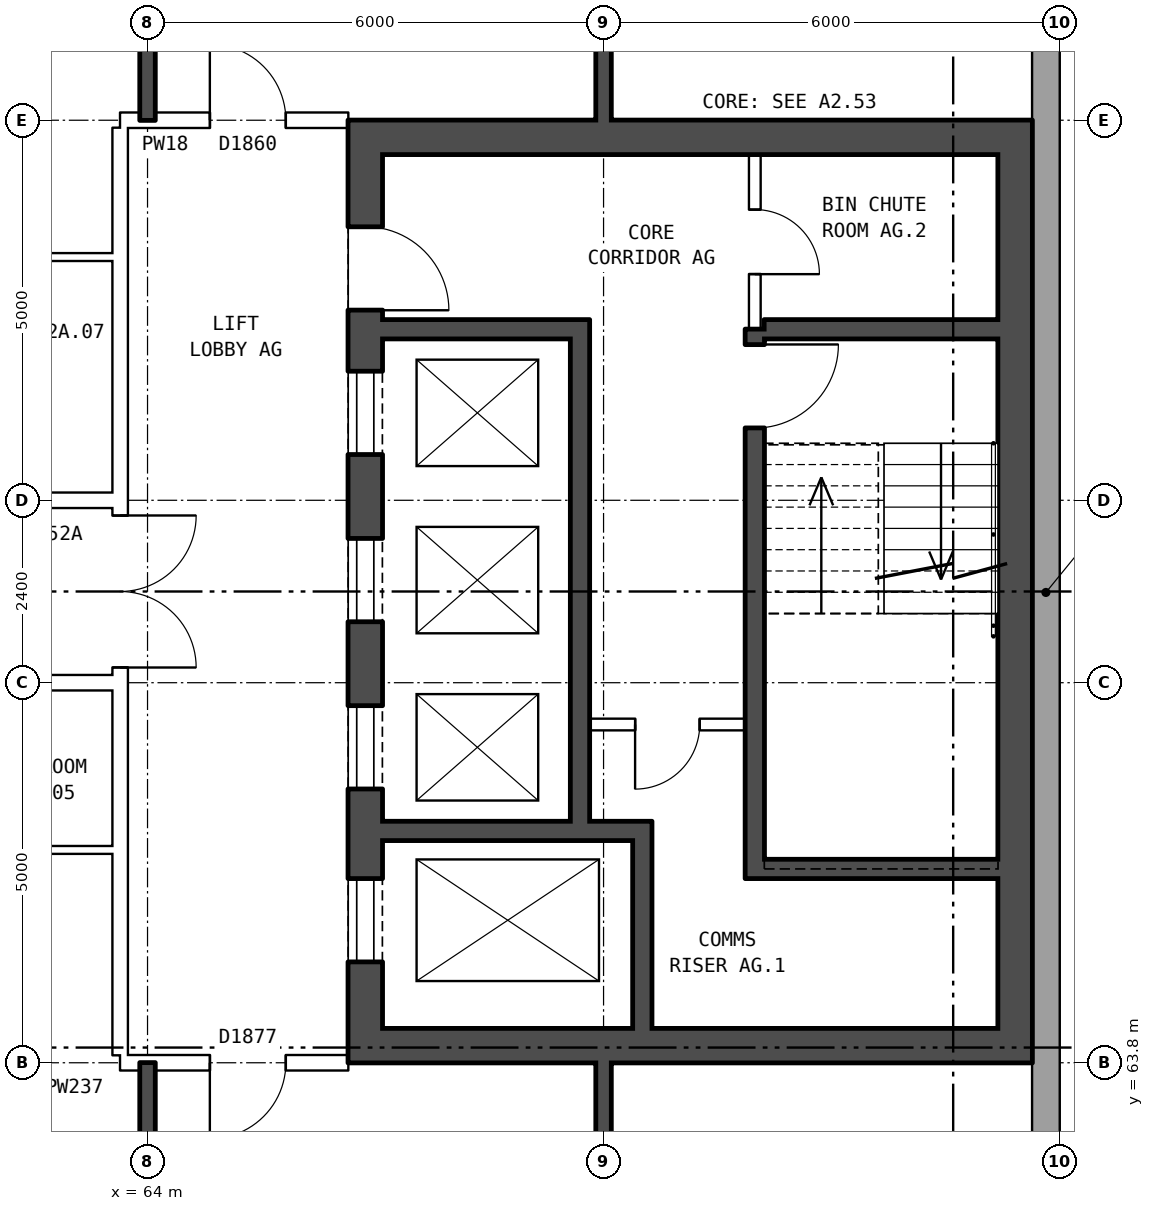
"""IFC4 building model, lengths in metres.
Left out: names, types, materials, properties, quantities, classifications, styles, units other than length and angle.
Written with IfcOpenShell. Run it as: python <this file> out.ifc"""

import sys

from ifc_helpers import new_model, si_unit, direction, frame, frame_2d, origin, place, context, subcontext, project, spatial, rectangle, extrude, element, fill, save


model = new_model("IFC4")
c1 = context("Model", 3, precision=1e-05, world=origin(), true_north=direction((0.0, 1.0)))
c2 = subcontext(c1, "Body", "Model", "MODEL_VIEW")
j1 = project(units=[si_unit("LENGTHUNIT", "METRE"), si_unit("PLANEANGLEUNIT", "RADIAN")], contexts=[c1])
p1 = place(None, origin())
s1 = spatial("IfcSite", under=j1, at=p1, CompositionType="ELEMENT")
p2 = place(p1, origin())
s2 = spatial("IfcBuilding", under=s1, at=p2, CompositionType="ELEMENT")
p3 = place(p2, frame((0.0, 0.0, 185.1)))
s3 = spatial("IfcBuildingStorey", under=s2, at=p3, CompositionType="ELEMENT", Elevation=185.1)
p4 = place(p3, frame((75.82, 57.075, 0.0), z_axis=(0.0, 0.0, 1.0), x_axis=(0.0, 1.0, 0.0)))
e1 = element("IfcWall", 1, at=p4, inside=s3, PredefinedType="STANDARD", context=c2, shape_type="SweptSolid", body=[
    extrude(rectangle(XDim=25.851, YDim=0.36, at=frame_2d((12.925, 0.0))), origin(), (0.0, 0.0, 1.0), 2.85),
])
p5 = place(p4, frame((1.625, 0.0, 0.8)))
e2 = element("IfcOpeningElement", 2, at=p5, cuts=e1, PredefinedType="OPENING", context=c2, shape_type="SweptSolid", body=[
    extrude(rectangle(XDim=1.6, YDim=1.8, at=frame_2d((0.8, 0.9))), frame((0.0, 0.19, 0.0), z_axis=(0.0, -1.0, 0.0), x_axis=(1.0, 0.0, 0.0)), (0.0, 0.0, 1.0), 0.38),
])
p6 = place(p4, frame((3.525, 0.0, 0.8)))
e3 = element("IfcOpeningElement", 3, at=p6, cuts=e1, PredefinedType="OPENING", context=c2, shape_type="SweptSolid", body=[
    extrude(rectangle(XDim=0.8, YDim=1.8, at=frame_2d((0.4, 0.9))), frame((0.0, 0.19, 0.0), z_axis=(0.0, -1.0, 0.0), x_axis=(1.0, 0.0, 0.0)), (0.0, 0.0, 1.0), 0.38),
])
p7 = place(p4, frame((20.2, 0.0, 0.8)))
e4 = element("IfcOpeningElement", 4, at=p7, cuts=e1, PredefinedType="OPENING", context=c2, shape_type="SweptSolid", body=[
    extrude(rectangle(XDim=0.6, YDim=0.9, at=frame_2d((0.3, 0.45))), frame((0.0, 0.19, 0.0), z_axis=(0.0, -1.0, 0.0), x_axis=(1.0, 0.0, 0.0)), (0.0, 0.0, 1.0), 0.38),
])
p8 = place(p4, frame((22.625, 0.0, 0.8)))
e5 = element("IfcOpeningElement", 5, at=p8, cuts=e1, PredefinedType="OPENING", context=c2, shape_type="SweptSolid", body=[
    extrude(rectangle(XDim=1.6, YDim=1.8, at=frame_2d((0.8, 0.9))), frame((0.0, 0.19, 0.0), z_axis=(0.0, -1.0, 0.0), x_axis=(1.0, 0.0, 0.0)), (0.0, 0.0, 1.0), 0.38),
])
p9 = place(p4, frame((4.625, 0.0, 0.8)))
e6 = element("IfcOpeningElement", 6, at=p9, cuts=e1, PredefinedType="OPENING", context=c2, shape_type="SweptSolid", body=[
    extrude(rectangle(XDim=1.0, YDim=0.9, at=frame_2d((0.5, 0.45))), frame((0.0, 0.19, 0.0), z_axis=(0.0, -1.0, 0.0), x_axis=(1.0, 0.0, 0.0)), (0.0, 0.0, 1.0), 0.38),
])
p10 = place(p4, frame((21.1, 0.0, 0.8)))
e7 = element("IfcOpeningElement", 7, at=p10, cuts=e1, PredefinedType="OPENING", context=c2, shape_type="SweptSolid", body=[
    extrude(rectangle(XDim=1.2, YDim=1.5, at=frame_2d((0.6, 0.75))), frame((0.0, 0.19, 0.0), z_axis=(0.0, -1.0, 0.0), x_axis=(1.0, 0.0, 0.0)), (0.0, 0.0, 1.0), 0.38),
])
p11 = place(p3, frame((66.865, 63.8, 0.0), z_axis=(0.0, 0.0, 1.0), x_axis=(0.0, 1.0, 0.0)))
e8 = element("IfcWall", 8, at=p11, inside=s3, PredefinedType="SHEAR", context=c2, shape_type="SweptSolid", body=[
    extrude(rectangle(XDim=12.4, YDim=0.45, at=frame_2d((6.2, 0.0))), origin(), (0.0, 0.0, 1.0), 2.85),
])
p12 = place(p11, frame((1.325, 0.0, 0.0)))
e9 = element("IfcOpeningElement", 9, at=p12, cuts=e8, PredefinedType="OPENING", context=c2, shape_type="SweptSolid", body=[
    extrude(rectangle(XDim=1.1, YDim=2.1, at=frame_2d((0.55, 1.05))), frame((0.0, 0.235, 0.0), z_axis=(0.0, -1.0, 0.0), x_axis=(1.0, 0.0, 0.0)), (0.0, 0.0, 1.0), 0.47),
])
p13 = place(p11, frame((3.6, 0.0, 0.0)))
e10 = element("IfcOpeningElement", 10, at=p13, cuts=e8, PredefinedType="OPENING", context=c2, shape_type="SweptSolid", body=[
    extrude(rectangle(XDim=1.1, YDim=2.1, at=frame_2d((0.55, 1.05))), frame((0.0, 0.235, 0.0), z_axis=(0.0, -1.0, 0.0), x_axis=(1.0, 0.0, 0.0)), (0.0, 0.0, 1.0), 0.47),
])
p14 = place(p11, frame((5.8, 0.0, 0.0)))
e11 = element("IfcOpeningElement", 11, at=p14, cuts=e8, PredefinedType="OPENING", context=c2, shape_type="SweptSolid", body=[
    extrude(rectangle(XDim=1.1, YDim=2.1, at=frame_2d((0.55, 1.05))), frame((0.0, 0.235, 0.0), z_axis=(0.0, -1.0, 0.0), x_axis=(1.0, 0.0, 0.0)), (0.0, 0.0, 1.0), 0.47),
])
p15 = place(p11, frame((8.0, 0.0, 0.0)))
e12 = element("IfcOpeningElement", 12, at=p15, cuts=e8, PredefinedType="OPENING", context=c2, shape_type="SweptSolid", body=[
    extrude(rectangle(XDim=1.1, YDim=2.1, at=frame_2d((0.55, 1.05))), frame((0.0, 0.235, 0.0), z_axis=(0.0, -1.0, 0.0), x_axis=(1.0, 0.0, 0.0)), (0.0, 0.0, 1.0), 0.47),
])
p16 = place(p11, frame((9.9, 0.0, 0.0)))
e13 = element("IfcOpeningElement", 13, at=p16, cuts=e8, PredefinedType="OPENING", context=c2, shape_type="SweptSolid", body=[
    extrude(rectangle(XDim=1.1, YDim=2.1, at=frame_2d((0.55, 1.05))), frame((0.0, 0.235, 0.0), z_axis=(0.0, -1.0, 0.0), x_axis=(1.0, 0.0, 0.0)), (0.0, 0.0, 1.0), 0.47),
])
p17 = place(p3, frame((75.415, 63.8, 0.0), z_axis=(0.0, 0.0, 1.0), x_axis=(0.0, 1.0, 0.0)))
e14 = element("IfcWall", 14, at=p17, inside=s3, PredefinedType="SHEAR", context=c2, shape_type="SweptSolid", body=[
    extrude(rectangle(XDim=12.4, YDim=0.45, at=frame_2d((6.2, 0.0))), origin(), (0.0, 0.0, 1.0), 2.85),
])
for number, where, z_axis, x_axis in (
    (15, (67.09, 64.025, 0.0), (0.0, 0.0, 1.0), (1.0, 0.0, 0.0)),
    (16, (67.09, 75.975, 0.0), (0.0, 0.0, 1.0), (1.0, 0.0, 0.0)),
):
    element("IfcWall", number, at=place(p3, frame(where, z_axis=z_axis, x_axis=x_axis)), inside=s3, PredefinedType="SHEAR", context=c2, shape_type="SweptSolid", body=[
        extrude(rectangle(XDim=8.1, YDim=0.45, at=frame_2d((4.05, 0.0))), origin(), (0.0, 0.0, 1.0), 2.85),
    ])
p18 = place(p3, frame((72.115, 66.35, 0.0), z_axis=(0.0, 0.0, 1.0), x_axis=(1.0, 0.0, 0.0)))
e17 = element("IfcWall", 17, at=p18, inside=s3, PredefinedType="SHEAR", context=c2, shape_type="SweptSolid", body=[
    extrude(rectangle(XDim=3.075, YDim=0.25, at=frame_2d((1.538, 0.0))), origin(), (0.0, 0.0, 1.0), 2.85),
])
p19 = place(p3, frame((67.09, 66.85, 0.0), z_axis=(0.0, 0.0, 1.0), x_axis=(1.0, 0.0, 0.0)))
e18 = element("IfcWall", 18, at=p19, inside=s3, PredefinedType="SHEAR", context=c2, shape_type="SweptSolid", body=[
    extrude(rectangle(XDim=3.545, YDim=0.25, at=frame_2d((1.772, 0.0))), origin(), (0.0, 0.0, 1.0), 2.85),
])
p20 = place(p3, frame((69.815, 68.25, 0.0), z_axis=(0.0, 0.0, 1.0), x_axis=(1.0, 0.0, 0.0)))
e19 = element("IfcWall", 19, at=p20, inside=s3, PredefinedType="PARTITIONING", context=c2, shape_type="SweptSolid", body=[
    extrude(rectangle(XDim=2.05, YDim=0.15, at=frame_2d((1.025, 0.0))), origin(), (0.0, 0.0, 1.0), 2.85),
])
p21 = place(p20, frame((0.6, 0.0, 0.0)))
e20 = element("IfcOpeningElement", 20, at=p21, cuts=e19, PredefinedType="OPENING", context=c2, shape_type="SweptSolid", body=[
    extrude(rectangle(XDim=0.85, YDim=2.1, at=frame_2d((0.425, 1.05))), frame((0.0, 0.085, 0.0), z_axis=(0.0, -1.0, 0.0), x_axis=(1.0, 0.0, 0.0)), (0.0, 0.0, 1.0), 0.17),
])
p22 = place(p3, frame((67.09, 73.45, 0.0), z_axis=(0.0, 0.0, 1.0), x_axis=(1.0, 0.0, 0.0)))
e21 = element("IfcWall", 21, at=p22, inside=s3, PredefinedType="SHEAR", context=c2, shape_type="SweptSolid", body=[
    extrude(rectangle(XDim=2.475, YDim=0.25, at=frame_2d((1.237, 0.0))), origin(), (0.0, 0.0, 1.0), 2.85),
])
p23 = place(p3, frame((72.115, 73.45, 0.0), z_axis=(0.0, 0.0, 1.0), x_axis=(1.0, 0.0, 0.0)))
e22 = element("IfcWall", 22, at=p23, inside=s3, PredefinedType="SHEAR", context=c2, shape_type="SweptSolid", body=[
    extrude(rectangle(XDim=3.075, YDim=0.25, at=frame_2d((1.538, 0.0))), origin(), (0.0, 0.0, 1.0), 2.85),
])
p24 = place(p3, frame((69.69, 66.975, 0.0), z_axis=(0.0, 0.0, 1.0), x_axis=(0.0, 1.0, 0.0)))
e23 = element("IfcWall", 23, at=p24, inside=s3, PredefinedType="SHEAR", context=c2, shape_type="SweptSolid", body=[
    extrude(rectangle(XDim=6.6, YDim=0.25, at=frame_2d((3.3, 0.0))), origin(), (0.0, 0.0, 1.0), 2.85),
])
p25 = place(p3, frame((70.51, 64.25, 0.0), z_axis=(0.0, 0.0, 1.0), x_axis=(0.0, 1.0, 0.0)))
e24 = element("IfcWall", 24, at=p25, inside=s3, PredefinedType="SHEAR", context=c2, shape_type="SweptSolid", body=[
    extrude(rectangle(XDim=2.475, YDim=0.25, at=frame_2d((1.238, 0.0))), origin(), (0.0, 0.0, 1.0), 2.85),
])
p26 = place(p3, frame((71.99, 66.225, 0.0), z_axis=(0.0, 0.0, 1.0), x_axis=(0.0, 1.0, 0.0)))
e25 = element("IfcWall", 25, at=p26, inside=s3, PredefinedType="SHEAR", context=c2, shape_type="SweptSolid", body=[
    extrude(rectangle(XDim=7.225, YDim=0.25, at=frame_2d((3.612, 0.0))), origin(), (0.0, 0.0, 1.0), 2.85),
])
p27 = place(p26, frame((5.925, 0.0, 0.0)))
e26 = element("IfcOpeningElement", 26, at=p27, cuts=e25, PredefinedType="OPENING", context=c2, shape_type="SweptSolid", body=[
    extrude(rectangle(XDim=1.1, YDim=2.1, at=frame_2d((0.55, 1.05))), frame((0.0, 0.135, 0.0), z_axis=(0.0, -1.0, 0.0), x_axis=(1.0, 0.0, 0.0)), (0.0, 0.0, 1.0), 0.27),
])
p28 = place(p3, frame((71.99, 73.45, 0.0), z_axis=(0.0, 0.0, 1.0), x_axis=(0.0, 1.0, 0.0)))
e27 = element("IfcWall", 27, at=p28, inside=s3, PredefinedType="PARTITIONING", context=c2, shape_type="SweptSolid", body=[
    extrude(rectangle(XDim=2.3, YDim=0.15, at=frame_2d((1.15, 0.0))), origin(), (0.0, 0.0, 1.0), 2.85),
])
p29 = place(p28, frame((0.725, 0.0, 0.0)))
e28 = element("IfcOpeningElement", 28, at=p29, cuts=e27, PredefinedType="OPENING", context=c2, shape_type="SweptSolid", body=[
    extrude(rectangle(XDim=0.85, YDim=2.1, at=frame_2d((0.425, 1.05))), frame((0.0, 0.085, 0.0), z_axis=(0.0, -1.0, 0.0), x_axis=(1.0, 0.0, 0.0)), (0.0, 0.0, 1.0), 0.17),
])
p30 = place(p3, frame((63.64, 63.9, 0.0), z_axis=(0.0, 0.0, 1.0), x_axis=(0.0, 1.0, 0.0)))
e29 = element("IfcWall", 29, at=p30, inside=s3, PredefinedType="PARTITIONING", context=c2, shape_type="SweptSolid", body=[
    extrude(rectangle(XDim=12.2, YDim=0.2, at=frame_2d((6.1, 0.0))), origin(), (0.0, 0.0, 1.0), 2.85),
])
p31 = place(p30, frame((5.1, 0.0, 0.0)))
e30 = element("IfcOpeningElement", 30, at=p31, cuts=e29, PredefinedType="OPENING", context=c2, shape_type="SweptSolid", body=[
    extrude(rectangle(XDim=2.0, YDim=2.1, at=frame_2d((1.0, 1.05))), frame((0.0, 0.11, 0.0), z_axis=(0.0, -1.0, 0.0), x_axis=(1.0, 0.0, 0.0)), (0.0, 0.0, 1.0), 0.22),
])
p32 = place(p3, frame((63.64, 63.8, 0.0), z_axis=(0.0, 0.0, 1.0), x_axis=(1.0, 0.0, 0.0)))
e31 = element("IfcWall", 31, at=p32, inside=s3, PredefinedType="PARTITIONING", context=c2, shape_type="SweptSolid", body=[
    extrude(rectangle(XDim=3.0, YDim=0.2, at=frame_2d((1.5, 0.0))), origin(), (0.0, 0.0, 1.0), 2.85),
])
p33 = place(p32, frame((1.18, 0.0, 0.0)))
e32 = element("IfcOpeningElement", 32, at=p33, cuts=e31, PredefinedType="OPENING", context=c2, shape_type="SweptSolid", body=[
    extrude(rectangle(XDim=1.0, YDim=2.1, at=frame_2d((0.5, 1.05))), frame((0.0, 0.11, 0.0), z_axis=(0.0, -1.0, 0.0), x_axis=(1.0, 0.0, 0.0)), (0.0, 0.0, 1.0), 0.22),
])
p34 = place(p3, frame((61.0, 66.6, 0.0), z_axis=(0.0, 0.0, 1.0), x_axis=(1.0, 0.0, 0.0)))
e33 = element("IfcWall", 33, at=p34, inside=s3, PredefinedType="PARTITIONING", context=c2, shape_type="SweptSolid", body=[
    extrude(rectangle(XDim=2.64, YDim=0.1, at=frame_2d((1.32, 0.0))), origin(), (0.0, 0.0, 1.0), 2.85),
])
p35 = place(p3, frame((44.36, 68.8, 0.0), z_axis=(0.0, 0.0, 1.0), x_axis=(1.0, 0.0, 0.0)))
e34 = element("IfcWall", 34, at=p35, inside=s3, PredefinedType="PARTITIONING", context=c2, shape_type="SweptSolid", body=[
    extrude(rectangle(XDim=19.28, YDim=0.2, at=frame_2d((9.64, 0.0))), origin(), (0.0, 0.0, 1.0), 2.85),
])
p36 = place(p35, frame((14.64, 0.0, 0.0)))
e35 = element("IfcOpeningElement", 35, at=p36, cuts=e34, PredefinedType="OPENING", context=c2, shape_type="SweptSolid", body=[
    extrude(rectangle(XDim=1.0, YDim=2.1, at=frame_2d((0.5, 1.05))), frame((0.0, 0.11, 0.0), z_axis=(0.0, -1.0, 0.0), x_axis=(1.0, 0.0, 0.0)), (0.0, 0.0, 1.0), 0.22),
])
p37 = place(p35, frame((5.64, 0.0, 0.0)))
e36 = element("IfcOpeningElement", 36, at=p37, cuts=e34, PredefinedType="OPENING", context=c2, shape_type="SweptSolid", body=[
    extrude(rectangle(XDim=1.0, YDim=2.1, at=frame_2d((0.5, 1.05))), frame((0.0, 0.11, 0.0), z_axis=(0.0, -1.0, 0.0), x_axis=(1.0, 0.0, 0.0)), (0.0, 0.0, 1.0), 0.22),
])
p38 = place(p3, frame((44.36, 71.2, 0.0), z_axis=(0.0, 0.0, 1.0), x_axis=(1.0, 0.0, 0.0)))
e37 = element("IfcWall", 37, at=p38, inside=s3, PredefinedType="PARTITIONING", context=c2, shape_type="SweptSolid", body=[
    extrude(rectangle(XDim=19.28, YDim=0.2, at=frame_2d((9.64, 0.0))), origin(), (0.0, 0.0, 1.0), 2.85),
])
p39 = place(p38, frame((14.64, 0.0, 0.0)))
e38 = element("IfcOpeningElement", 38, at=p39, cuts=e37, PredefinedType="OPENING", context=c2, shape_type="SweptSolid", body=[
    extrude(rectangle(XDim=1.0, YDim=2.1, at=frame_2d((0.5, 1.05))), frame((0.0, 0.11, 0.0), z_axis=(0.0, -1.0, 0.0), x_axis=(1.0, 0.0, 0.0)), (0.0, 0.0, 1.0), 0.22),
])
p40 = place(p38, frame((5.64, 0.0, 0.0)))
e39 = element("IfcOpeningElement", 39, at=p40, cuts=e37, PredefinedType="OPENING", context=c2, shape_type="SweptSolid", body=[
    extrude(rectangle(XDim=1.0, YDim=2.1, at=frame_2d((0.5, 1.05))), frame((0.0, 0.11, 0.0), z_axis=(0.0, -1.0, 0.0), x_axis=(1.0, 0.0, 0.0)), (0.0, 0.0, 1.0), 0.22),
])
p41 = place(p3, frame((61.0, 74.4, 0.0), z_axis=(0.0, 0.0, 1.0), x_axis=(1.0, 0.0, 0.0)))
e40 = element("IfcWall", 40, at=p41, inside=s3, PredefinedType="PARTITIONING", context=c2, shape_type="SweptSolid", body=[
    extrude(rectangle(XDim=2.64, YDim=0.1, at=frame_2d((1.32, 0.0))), origin(), (0.0, 0.0, 1.0), 2.85),
])
p42 = place(p3, frame((63.64, 76.2, 0.0), z_axis=(0.0, 0.0, 1.0), x_axis=(1.0, 0.0, 0.0)))
e41 = element("IfcWall", 41, at=p42, inside=s3, PredefinedType="PARTITIONING", context=c2, shape_type="SweptSolid", body=[
    extrude(rectangle(XDim=3.0, YDim=0.2, at=frame_2d((1.5, 0.0))), origin(), (0.0, 0.0, 1.0), 2.85),
])
p43 = place(p42, frame((1.18, 0.0, 0.0)))
e42 = element("IfcOpeningElement", 42, at=p43, cuts=e41, PredefinedType="OPENING", context=c2, shape_type="SweptSolid", body=[
    extrude(rectangle(XDim=1.0, YDim=2.1, at=frame_2d((0.5, 1.05))), frame((0.0, 0.11, 0.0), z_axis=(0.0, -1.0, 0.0), x_axis=(1.0, 0.0, 0.0)), (0.0, 0.0, 1.0), 0.22),
])
for number, where, z_axis, x_axis in (
    (43, (64.0, 54.36, 0.0), (0.0, 0.0, 1.0), (0.0, 1.0, 0.0)),
    (44, (64.0, 76.2, 0.0), (0.0, 0.0, 1.0), (0.0, 1.0, 0.0)),
):
    element("IfcWall", number, at=place(p3, frame(where, z_axis=z_axis, x_axis=x_axis)), inside=s3, PredefinedType="SOLIDWALL", context=c2, shape_type="SweptSolid", body=[
        extrude(rectangle(XDim=9.44, YDim=0.2, at=frame_2d((4.72, 0.0))), origin(), (0.0, 0.0, 1.0), 2.85),
    ])
p44 = place(p3, frame((70.0, 54.36, 0.0), z_axis=(0.0, 0.0, 1.0), x_axis=(0.0, 1.0, 0.0)))
e45 = element("IfcWall", 45, at=p44, inside=s3, PredefinedType="SOLIDWALL", context=c2, shape_type="SweptSolid", body=[
    extrude(rectangle(XDim=9.44, YDim=0.2, at=frame_2d((4.72, 0.0))), origin(), (0.0, 0.0, 1.0), 2.85),
])
p45 = place(p44, frame((7.34, 0.0, 0.0)))
e46 = element("IfcOpeningElement", 46, at=p45, cuts=e45, PredefinedType="OPENING", context=c2, shape_type="SweptSolid", body=[
    extrude(rectangle(XDim=0.9, YDim=2.1, at=frame_2d((0.45, 1.05))), frame((0.0, 0.11, 0.0), z_axis=(0.0, -1.0, 0.0), x_axis=(1.0, 0.0, 0.0)), (0.0, 0.0, 1.0), 0.22),
])
p46 = place(p3, frame((70.0, 76.2, 0.0), z_axis=(0.0, 0.0, 1.0), x_axis=(0.0, 1.0, 0.0)))
e47 = element("IfcWall", 47, at=p46, inside=s3, PredefinedType="SOLIDWALL", context=c2, shape_type="SweptSolid", body=[
    extrude(rectangle(XDim=9.44, YDim=0.2, at=frame_2d((4.72, 0.0))), origin(), (0.0, 0.0, 1.0), 2.85),
])
p47 = place(p46, frame((1.35, 0.0, 0.0)))
e48 = element("IfcOpeningElement", 48, at=p47, cuts=e47, PredefinedType="OPENING", context=c2, shape_type="SweptSolid", body=[
    extrude(rectangle(XDim=0.9, YDim=2.1, at=frame_2d((0.45, 1.05))), frame((0.0, 0.11, 0.0), z_axis=(0.0, -1.0, 0.0), x_axis=(1.0, 0.0, 0.0)), (0.0, 0.0, 1.0), 0.22),
])
p48 = place(p12, origin())
e49 = element("IfcDoor", 49, at=p48, inside=s3, OperationType="DOUBLE_DOOR_SLIDING", PredefinedType="DOOR", context=c2, shape_type="SweptSolid", body=[
    extrude(rectangle(XDim=1.1, YDim=2.1, at=frame_2d((0.55, 1.05))), frame((0.0, -0.16, 0.0), z_axis=(0.0, -1.0, 0.0), x_axis=(1.0, 0.0, 0.0)), (0.0, 0.0, 1.0), 0.05),
])
fill(e9, e49)
p49 = place(p13, origin())
e50 = element("IfcDoor", 50, at=p49, inside=s3, OperationType="DOUBLE_DOOR_SLIDING", PredefinedType="DOOR", context=c2, shape_type="SweptSolid", body=[
    extrude(rectangle(XDim=1.1, YDim=2.1, at=frame_2d((0.55, 1.05))), frame((0.0, -0.16, 0.0), z_axis=(0.0, -1.0, 0.0), x_axis=(1.0, 0.0, 0.0)), (0.0, 0.0, 1.0), 0.05),
])
fill(e10, e50)
p50 = place(p14, origin())
e51 = element("IfcDoor", 51, at=p50, inside=s3, OperationType="DOUBLE_DOOR_SLIDING", PredefinedType="DOOR", context=c2, shape_type="SweptSolid", body=[
    extrude(rectangle(XDim=1.1, YDim=2.1, at=frame_2d((0.55, 1.05))), frame((0.0, -0.16, 0.0), z_axis=(0.0, -1.0, 0.0), x_axis=(1.0, 0.0, 0.0)), (0.0, 0.0, 1.0), 0.05),
])
fill(e11, e51)
p51 = place(p15, origin())
e52 = element("IfcDoor", 52, at=p51, inside=s3, OperationType="DOUBLE_DOOR_SLIDING", PredefinedType="DOOR", context=c2, shape_type="SweptSolid", body=[
    extrude(rectangle(XDim=1.1, YDim=2.1, at=frame_2d((0.55, 1.05))), frame((0.0, -0.16, 0.0), z_axis=(0.0, -1.0, 0.0), x_axis=(1.0, 0.0, 0.0)), (0.0, 0.0, 1.0), 0.05),
])
fill(e12, e52)
p52 = place(p16, frame((1.1, 0.0, 0.0), z_axis=(0.0, 0.0, 1.0), x_axis=(-1.0, 0.0, 0.0)))
e53 = element("IfcDoor", 53, at=p52, inside=s3, OperationType="SINGLE_SWING_RIGHT", PredefinedType="DOOR", context=c2, shape_type="SweptSolid", body=[
    extrude(rectangle(XDim=1.1, YDim=2.1, at=frame_2d((0.55, 1.05))), frame((0.0, 0.21, 0.0), z_axis=(0.0, -1.0, 0.0), x_axis=(1.0, 0.0, 0.0)), (0.0, 0.0, 1.0), 0.05),
])
fill(e13, e53)
p53 = place(p27, frame((1.1, 0.0, 0.0), z_axis=(0.0, 0.0, 1.0), x_axis=(-1.0, 0.0, 0.0)))
e54 = element("IfcDoor", 54, at=p53, inside=s3, OperationType="SINGLE_SWING_LEFT", PredefinedType="DOOR", context=c2, shape_type="SweptSolid", body=[
    extrude(rectangle(XDim=1.1, YDim=2.1, at=frame_2d((0.55, 1.05))), frame((0.0, 0.025, 0.0), z_axis=(0.0, -1.0, 0.0), x_axis=(1.0, 0.0, 0.0)), (0.0, 0.0, 1.0), 0.05),
])
fill(e26, e54)
p54 = place(p21, frame((0.85, 0.0, 0.0), z_axis=(0.0, 0.0, 1.0), x_axis=(-1.0, 0.0, 0.0)))
e55 = element("IfcDoor", 55, at=p54, inside=s3, OperationType="SINGLE_SWING_RIGHT", PredefinedType="DOOR", context=c2, shape_type="SweptSolid", body=[
    extrude(rectangle(XDim=0.85, YDim=2.1, at=frame_2d((0.425, 1.05))), frame((0.0, 0.025, 0.0), z_axis=(0.0, -1.0, 0.0), x_axis=(1.0, 0.0, 0.0)), (0.0, 0.0, 1.0), 0.05),
])
fill(e20, e55)
p55 = place(p29, frame((0.85, 0.0, 0.0), z_axis=(0.0, 0.0, 1.0), x_axis=(-1.0, 0.0, 0.0)))
e56 = element("IfcDoor", 56, at=p55, inside=s3, OperationType="SINGLE_SWING_RIGHT", PredefinedType="DOOR", context=c2, shape_type="SweptSolid", body=[
    extrude(rectangle(XDim=0.85, YDim=2.1, at=frame_2d((0.425, 1.05))), frame((0.0, 0.025, 0.0), z_axis=(0.0, -1.0, 0.0), x_axis=(1.0, 0.0, 0.0)), (0.0, 0.0, 1.0), 0.05),
])
fill(e28, e56)
p56 = place(p31, frame((2.0, 0.0, 0.0), z_axis=(0.0, 0.0, 1.0), x_axis=(-1.0, 0.0, 0.0)))
e57 = element("IfcDoor", 57, at=p56, inside=s3, OperationType="DOUBLE_DOOR_SINGLE_SWING", PredefinedType="DOOR", context=c2, shape_type="SweptSolid", body=[
    extrude(rectangle(XDim=2.0, YDim=2.1, at=frame_2d((1.0, 1.05))), frame((0.0, 0.025, 0.0), z_axis=(0.0, -1.0, 0.0), x_axis=(1.0, 0.0, 0.0)), (0.0, 0.0, 1.0), 0.05),
])
fill(e30, e57)
p57 = place(p33, frame((1.0, 0.0, 0.0), z_axis=(0.0, 0.0, 1.0), x_axis=(-1.0, 0.0, 0.0)))
e58 = element("IfcDoor", 58, at=p57, inside=s3, OperationType="SINGLE_SWING_RIGHT", PredefinedType="DOOR", context=c2, shape_type="SweptSolid", body=[
    extrude(rectangle(XDim=1.0, YDim=2.1, at=frame_2d((0.5, 1.05))), frame((0.0, 0.025, 0.0), z_axis=(0.0, -1.0, 0.0), x_axis=(1.0, 0.0, 0.0)), (0.0, 0.0, 1.0), 0.05),
])
fill(e32, e58)
p58 = place(p43, origin())
e59 = element("IfcDoor", 59, at=p58, inside=s3, OperationType="SINGLE_SWING_LEFT", PredefinedType="DOOR", context=c2, shape_type="SweptSolid", body=[
    extrude(rectangle(XDim=1.0, YDim=2.1, at=frame_2d((0.5, 1.05))), frame((0.0, 0.025, 0.0), z_axis=(0.0, -1.0, 0.0), x_axis=(1.0, 0.0, 0.0)), (0.0, 0.0, 1.0), 0.05),
])
fill(e42, e59)
save(model, sys.argv[1])
